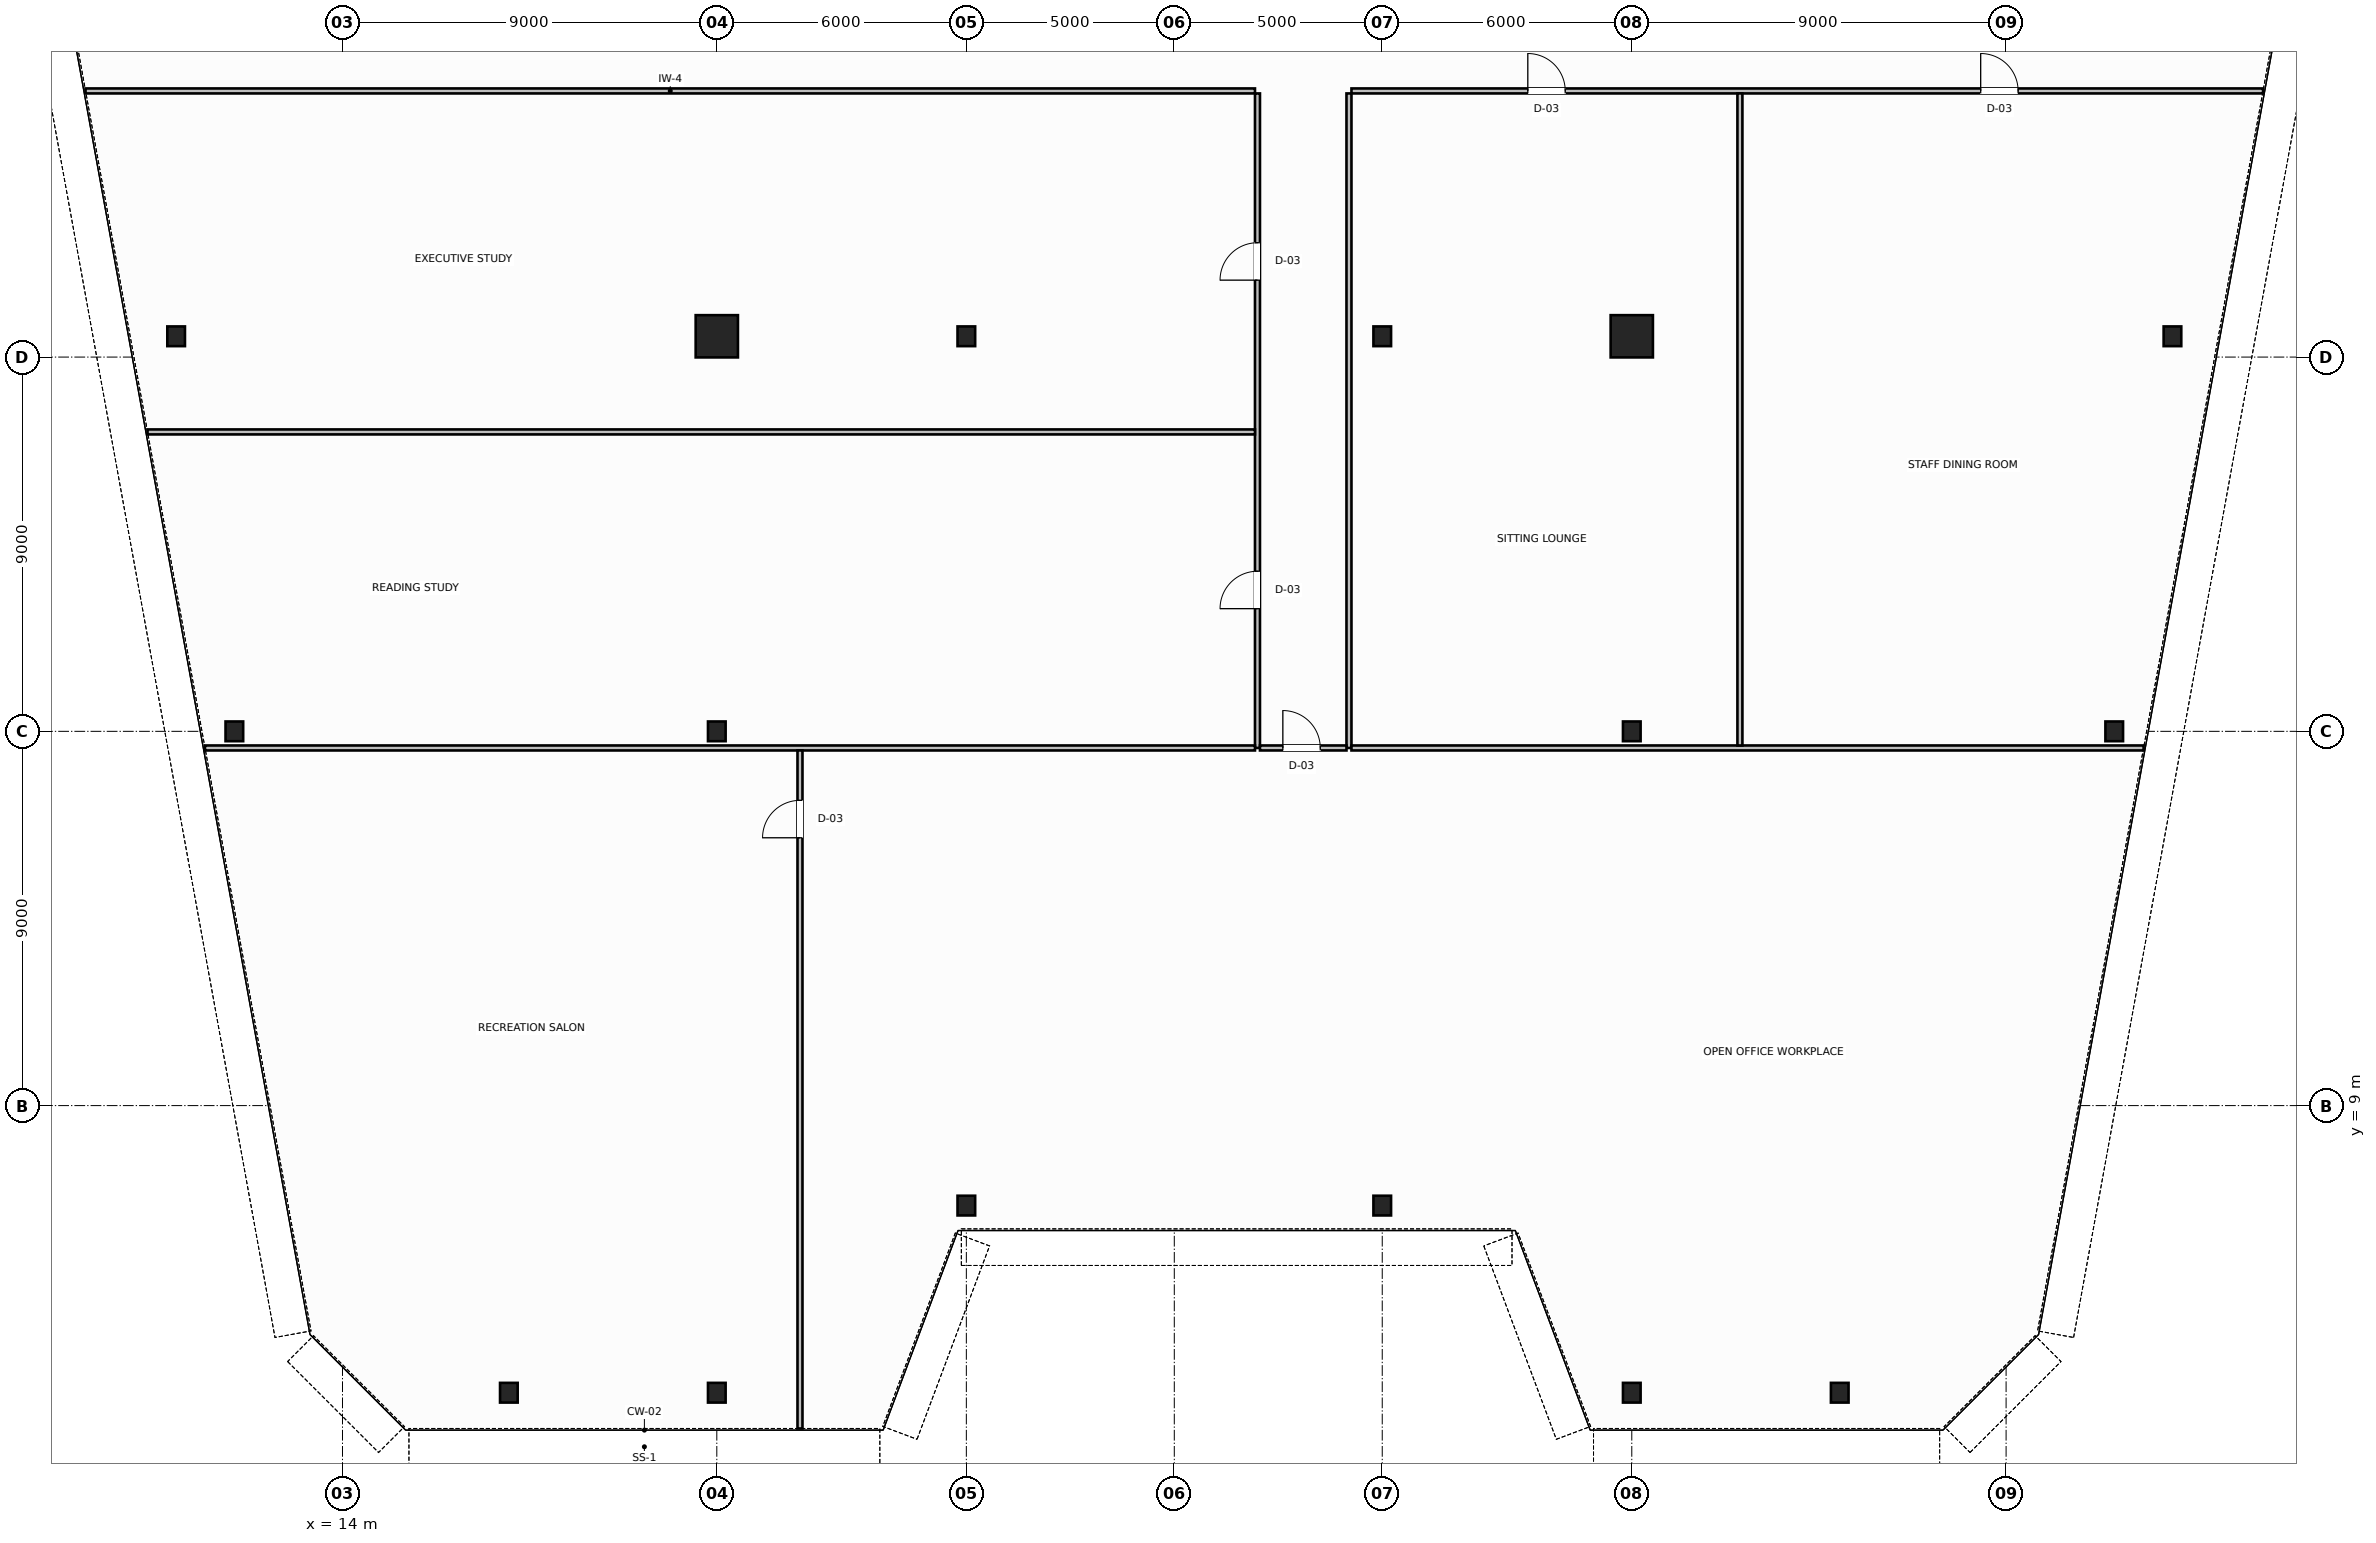
"""IFC4 building model, lengths in metres.
Left out: names, types, materials, properties, quantities, classifications, styles, units other than length and angle.
Written with IfcOpenShell. Run it as: python <this file> out.ifc"""

import sys

from ifc_helpers import new_model, si_unit, direction, frame, frame_2d, origin, origin_2d, place, context, subcontext, project, spatial, rectangle, hollow_circle, i_section, extrude, source, transform, mapped, element, fill, save


model = new_model("IFC4")
c1 = context("Model", 3, precision=1e-05, world=origin(), true_north=direction((0.0, 1.0)))
c2 = subcontext(c1, "Body", "Model", "MODEL_VIEW")
j1 = project(units=[si_unit("LENGTHUNIT", "METRE"), si_unit("PLANEANGLEUNIT", "RADIAN")], contexts=[c1])
p1 = place(None, origin())
s1 = spatial("IfcSite", under=j1, at=p1, CompositionType="ELEMENT")
p2 = place(p1, origin())
s2 = spatial("IfcBuilding", under=s1, at=p2, CompositionType="ELEMENT")
p3 = place(p2, frame((0.0, 0.0, 126.2)))
s3 = spatial("IfcBuildingStorey", under=s2, at=p3, CompositionType="ELEMENT", Elevation=126.2)
m1 = source(origin(), c2, "Body", "SweptSolid", [
    extrude(i_section(OverallWidth=0.424, OverallDepth=0.474, WebThickness=0.047, FlangeThickness=0.065, FilletRadius=0.015, at=origin_2d()), origin(), (0.0, 0.0, 1.0), 3.8),
])
for number, where, z_axis, x_axis in (
    (1, (10.0, 27.5, 0.0), (0.0, 0.0, 1.0), (1.0, 0.0, 0.0)),
    (2, (11.4, 18.0, 0.0), (0.0, 0.0, 1.0), (1.0, 0.0, 0.0)),
    (3, (58.0, 27.5, 0.0), (0.0, 0.0, 1.0), (1.0, 0.0, 0.0)),
    (4, (56.6, 18.0, 0.0), (0.0, 0.0, 1.0), (1.0, 0.0, 0.0)),
):
    element("IfcColumn", number, at=place(p3, frame(where, z_axis=z_axis, x_axis=x_axis)), inside=s3, PredefinedType="COLUMN", context=c2, shape_type="MappedRepresentation", body=[
        mapped(m1, transform((0.0, 0.0, 0.0), scale=1.0)),
    ])
m2 = source(origin(), c2, "Body", "SweptSolid", [
    extrude(hollow_circle(Radius=0.508, WallThickness=0.045, at=origin_2d()), origin(), (0.0, 0.0, 1.0), 3.8),
])
p4 = place(p3, frame((23.0, 27.5, 0.0), z_axis=(0.0, 0.0, 1.0), x_axis=(1.0, 0.0, 0.0)))
e5 = element("IfcColumn", 5, at=p4, inside=s3, PredefinedType="COLUMN", context=c2, shape_type="MappedRepresentation", body=[
    mapped(m2, transform((0.0, 0.0, 0.0), scale=1.0)),
])
m3 = source(origin(), c2, "Body", "SweptSolid", [
    extrude(i_section(OverallWidth=0.424, OverallDepth=0.474, WebThickness=0.047, FlangeThickness=0.065, FilletRadius=0.015, at=origin_2d()), origin(), (0.0, 0.0, 1.0), 3.8),
])
for number, where, z_axis, x_axis in (
    (6, (29.0, 27.5, 0.0), (0.0, 0.0, 1.0), (1.0, 0.0, 0.0)),
    (7, (39.0, 27.5, 0.0), (0.0, 0.0, 1.0), (1.0, 0.0, 0.0)),
):
    element("IfcColumn", number, at=place(p3, frame(where, z_axis=z_axis, x_axis=x_axis)), inside=s3, PredefinedType="COLUMN", context=c2, shape_type="MappedRepresentation", body=[
        mapped(m3, transform((0.0, 0.0, 0.0), scale=1.0)),
    ])
p5 = place(p3, frame((45.0, 27.5, 0.0), z_axis=(0.0, 0.0, 1.0), x_axis=(1.0, 0.0, 0.0)))
e8 = element("IfcColumn", 8, at=p5, inside=s3, PredefinedType="COLUMN", context=c2, shape_type="MappedRepresentation", body=[
    mapped(m2, transform((0.0, 0.0, 0.0), scale=1.0)),
])
for number, where, z_axis, x_axis in (
    (9, (23.0, 18.0, 0.0), (0.0, 0.0, 1.0), (1.0, 0.0, 0.0)),
    (10, (45.0, 18.0, 0.0), (0.0, 0.0, 1.0), (1.0, 0.0, 0.0)),
):
    element("IfcColumn", number, at=place(p3, frame(where, z_axis=z_axis, x_axis=x_axis)), inside=s3, PredefinedType="COLUMN", context=c2, shape_type="MappedRepresentation", body=[
        mapped(m3, transform((0.0, 0.0, 0.0), scale=1.0)),
    ])
m4 = source(origin(), c2, "Body", "SweptSolid", [
    extrude(i_section(OverallWidth=0.424, OverallDepth=0.474, WebThickness=0.047, FlangeThickness=0.065, FilletRadius=0.015, at=origin_2d()), origin(), (0.0, 0.0, 1.0), 3.744),
])
for number, where, z_axis, x_axis in (
    (11, (18.0, 2.095, 0.032), (0.0, -0.064, 0.998), (1.0, 0.0, 0.0)),
    (12, (23.0, 2.095, 0.032), (0.0, -0.064, 0.998), (1.0, 0.0, 0.0)),
    (13, (29.0, 6.595, 0.032), (0.0, -0.064, 0.998), (1.0, 0.0, 0.0)),
    (14, (39.0, 6.595, 0.032), (0.0, -0.064, 0.998), (1.0, 0.0, 0.0)),
    (15, (45.0, 2.095, 0.032), (0.0, -0.064, 0.998), (1.0, 0.0, 0.0)),
    (16, (50.0, 2.095, 0.032), (0.0, -0.064, 0.998), (1.0, 0.0, 0.0)),
):
    element("IfcColumn", number, at=place(p3, frame(where, z_axis=z_axis, x_axis=x_axis)), inside=s3, PredefinedType="COLUMN", context=c2, shape_type="MappedRepresentation", body=[
        mapped(m4, transform((0.0, 0.0, 0.0), scale=1.0)),
    ])
p6 = place(p3, frame((7.821, 33.4, 0.0), z_axis=(0.0, 0.0, 1.0), x_axis=(1.0, 0.0, 0.0)))
e17 = element("IfcWall", 17, at=p6, inside=s3, PredefinedType="PARTITIONING", context=c2, shape_type="SweptSolid", body=[
    extrude(rectangle(XDim=28.119, YDim=0.12, at=frame_2d((14.059, 0.0))), origin(), (0.0, 0.0, 1.0), 3.58),
])
p7 = place(p3, frame((38.26, 33.4, 0.0), z_axis=(0.0, 0.0, 1.0), x_axis=(1.0, 0.0, 0.0)))
e18 = element("IfcWall", 18, at=p7, inside=s3, PredefinedType="PARTITIONING", context=c2, shape_type="SweptSolid", body=[
    extrude(rectangle(XDim=21.919, YDim=0.12, at=frame_2d((10.959, 0.0))), origin(), (0.0, 0.0, 1.0), 3.58),
])
p8 = place(p7, frame((4.24, 0.0, 0.0)))
e19 = element("IfcOpeningElement", 19, at=p8, cuts=e18, PredefinedType="OPENING", context=c2, shape_type="SweptSolid", body=[
    extrude(rectangle(XDim=0.9, YDim=2.15, at=frame_2d((0.45, 1.075))), frame((0.0, 0.07, 0.0), z_axis=(0.0, -1.0, 0.0), x_axis=(1.0, 0.0, 0.0)), (0.0, 0.0, 1.0), 0.14),
])
p9 = place(p7, frame((15.129, 0.0, 0.0)))
e20 = element("IfcOpeningElement", 20, at=p9, cuts=e18, PredefinedType="OPENING", context=c2, shape_type="SweptSolid", body=[
    extrude(rectangle(XDim=0.9, YDim=2.15, at=frame_2d((0.45, 1.075))), frame((0.0, 0.07, 0.0), z_axis=(0.0, -1.0, 0.0), x_axis=(1.0, 0.0, 0.0)), (0.0, 0.0, 1.0), 0.14),
])
p10 = place(p3, frame((36.0, 17.6, 0.0), z_axis=(0.0, 0.0, 1.0), x_axis=(0.0, 1.0, 0.0)))
e21 = element("IfcWall", 21, at=p10, inside=s3, PredefinedType="PARTITIONING", context=c2, shape_type="SweptSolid", body=[
    extrude(rectangle(XDim=15.74, YDim=0.12, at=frame_2d((7.87, 0.0))), origin(), (0.0, 0.0, 1.0), 3.58),
])
p11 = place(p10, frame((3.35, 0.0, 0.0)))
e22 = element("IfcOpeningElement", 22, at=p11, cuts=e21, PredefinedType="OPENING", context=c2, shape_type="SweptSolid", body=[
    extrude(rectangle(XDim=0.9, YDim=2.15, at=frame_2d((0.45, 1.075))), frame((0.0, 0.07, 0.0), z_axis=(0.0, -1.0, 0.0), x_axis=(1.0, 0.0, 0.0)), (0.0, 0.0, 1.0), 0.14),
])
p12 = place(p10, frame((11.25, 0.0, 0.0)))
e23 = element("IfcOpeningElement", 23, at=p12, cuts=e21, PredefinedType="OPENING", context=c2, shape_type="SweptSolid", body=[
    extrude(rectangle(XDim=0.9, YDim=2.15, at=frame_2d((0.45, 1.075))), frame((0.0, 0.07, 0.0), z_axis=(0.0, -1.0, 0.0), x_axis=(1.0, 0.0, 0.0)), (0.0, 0.0, 1.0), 0.14),
])
p13 = place(p3, frame((38.2, 17.6, 0.0), z_axis=(0.0, 0.0, 1.0), x_axis=(0.0, 1.0, 0.0)))
e24 = element("IfcWall", 24, at=p13, inside=s3, PredefinedType="PARTITIONING", context=c2, shape_type="SweptSolid", body=[
    extrude(rectangle(XDim=15.74, YDim=0.12, at=frame_2d((7.87, 0.0))), origin(), (0.0, 0.0, 1.0), 3.58),
])
p14 = place(p3, frame((36.06, 17.6, 0.0), z_axis=(0.0, 0.0, 1.0), x_axis=(1.0, 0.0, 0.0)))
e25 = element("IfcWall", 25, at=p14, inside=s3, PredefinedType="PARTITIONING", context=c2, shape_type="SweptSolid", body=[
    extrude(rectangle(XDim=2.08, YDim=0.12, at=frame_2d((1.04, 0.0))), origin(), (0.0, 0.0, 1.0), 3.58),
])
p15 = place(p14, frame((0.55, 0.0, 0.0)))
e26 = element("IfcOpeningElement", 26, at=p15, cuts=e25, PredefinedType="OPENING", context=c2, shape_type="SweptSolid", body=[
    extrude(rectangle(XDim=0.9, YDim=2.15, at=frame_2d((0.45, 1.075))), frame((0.0, 0.07, 0.0), z_axis=(0.0, -1.0, 0.0), x_axis=(1.0, 0.0, 0.0)), (0.0, 0.0, 1.0), 0.14),
])
p16 = place(p3, frame((10.694, 17.6, 0.0), z_axis=(0.0, 0.0, 1.0), x_axis=(1.0, 0.0, 0.0)))
e27 = element("IfcWall", 27, at=p16, inside=s3, PredefinedType="PARTITIONING", context=c2, shape_type="SweptSolid", body=[
    extrude(rectangle(XDim=25.246, YDim=0.12, at=frame_2d((12.623, 0.0))), origin(), (0.0, 0.0, 1.0), 3.58),
])
p17 = place(p3, frame((38.26, 17.6, 0.0), z_axis=(0.0, 0.0, 1.0), x_axis=(1.0, 0.0, 0.0)))
e28 = element("IfcWall", 28, at=p17, inside=s3, PredefinedType="PARTITIONING", context=c2, shape_type="SweptSolid", body=[
    extrude(rectangle(XDim=19.046, YDim=0.12, at=frame_2d((9.523, 0.0))), origin(), (0.0, 0.0, 1.0), 3.58),
])
p18 = place(p3, frame((25.0, 1.235, 0.0), z_axis=(0.0, 0.0, 1.0), x_axis=(0.0, 1.0, 0.0)))
e29 = element("IfcWall", 29, at=p18, inside=s3, PredefinedType="PARTITIONING", context=c2, shape_type="SweptSolid", body=[
    extrude(rectangle(XDim=16.305, YDim=0.12, at=frame_2d((8.152, 0.0))), origin(), (0.0, 0.0, 1.0), 3.58),
])
p19 = place(p18, frame((14.205, 0.0, 0.0)))
e30 = element("IfcOpeningElement", 30, at=p19, cuts=e29, PredefinedType="OPENING", context=c2, shape_type="SweptSolid", body=[
    extrude(rectangle(XDim=0.9, YDim=2.15, at=frame_2d((0.45, 1.075))), frame((0.0, 0.07, 0.0), z_axis=(0.0, -1.0, 0.0), x_axis=(1.0, 0.0, 0.0)), (0.0, 0.0, 1.0), 0.14),
])
p20 = place(p3, frame((9.312, 25.2, 0.0), z_axis=(0.0, 0.0, 1.0), x_axis=(1.0, 0.0, 0.0)))
e31 = element("IfcWall", 31, at=p20, inside=s3, PredefinedType="PARTITIONING", context=c2, shape_type="SweptSolid", body=[
    extrude(rectangle(XDim=26.628, YDim=0.12, at=frame_2d((13.314, 0.0))), origin(), (0.0, 0.0, 1.0), 3.58),
])
p21 = place(p3, frame((47.6, 17.66, 0.0), z_axis=(0.0, 0.0, 1.0), x_axis=(0.0, 1.0, 0.0)))
e32 = element("IfcWall", 32, at=p21, inside=s3, PredefinedType="PARTITIONING", context=c2, shape_type="SweptSolid", body=[
    extrude(rectangle(XDim=15.68, YDim=0.12, at=frame_2d((7.84, 0.0))), origin(), (0.0, 0.0, 1.0), 3.58),
])
m5 = source(origin(), c2, "Body", "SweptSolid", [
    extrude(rectangle(XDim=0.9, YDim=2.15, at=frame_2d((0.45, 1.075))), frame((0.0, 0.025, 0.0), z_axis=(0.0, -1.0, 0.0), x_axis=(1.0, 0.0, 0.0)), (0.0, 0.0, 1.0), 0.05),
])
p22 = place(p19, origin())
e33 = element("IfcDoor", 33, at=p22, inside=s3, OperationType="SINGLE_SWING_RIGHT", PredefinedType="DOOR", context=c2, shape_type="MappedRepresentation", body=[
    mapped(m5, transform((0.0, 0.0, 0.0), scale=1.0)),
])
fill(e30, e33)
p23 = place(p15, origin())
e34 = element("IfcDoor", 34, at=p23, inside=s3, OperationType="SINGLE_SWING_LEFT", PredefinedType="DOOR", context=c2, shape_type="MappedRepresentation", body=[
    mapped(m5, transform((0.0, 0.0, 0.0), scale=1.0)),
])
fill(e26, e34)
p24 = place(p11, origin())
e35 = element("IfcDoor", 35, at=p24, inside=s3, OperationType="SINGLE_SWING_LEFT", PredefinedType="DOOR", context=c2, shape_type="MappedRepresentation", body=[
    mapped(m5, transform((0.0, 0.0, 0.0), scale=1.0)),
])
fill(e22, e35)
p25 = place(p12, origin())
e36 = element("IfcDoor", 36, at=p25, inside=s3, OperationType="SINGLE_SWING_RIGHT", PredefinedType="DOOR", context=c2, shape_type="MappedRepresentation", body=[
    mapped(m5, transform((0.0, 0.0, 0.0), scale=1.0)),
])
fill(e23, e36)
p26 = place(p8, origin())
e37 = element("IfcDoor", 37, at=p26, inside=s3, OperationType="SINGLE_SWING_RIGHT", PredefinedType="DOOR", context=c2, shape_type="MappedRepresentation", body=[
    mapped(m5, transform((0.0, 0.0, 0.0), scale=1.0)),
])
fill(e19, e37)
p27 = place(p9, origin())
e38 = element("IfcDoor", 38, at=p27, inside=s3, OperationType="SINGLE_SWING_LEFT", PredefinedType="DOOR", context=c2, shape_type="MappedRepresentation", body=[
    mapped(m5, transform((0.0, 0.0, 0.0), scale=1.0)),
])
fill(e20, e38)
save(model, sys.argv[1])
